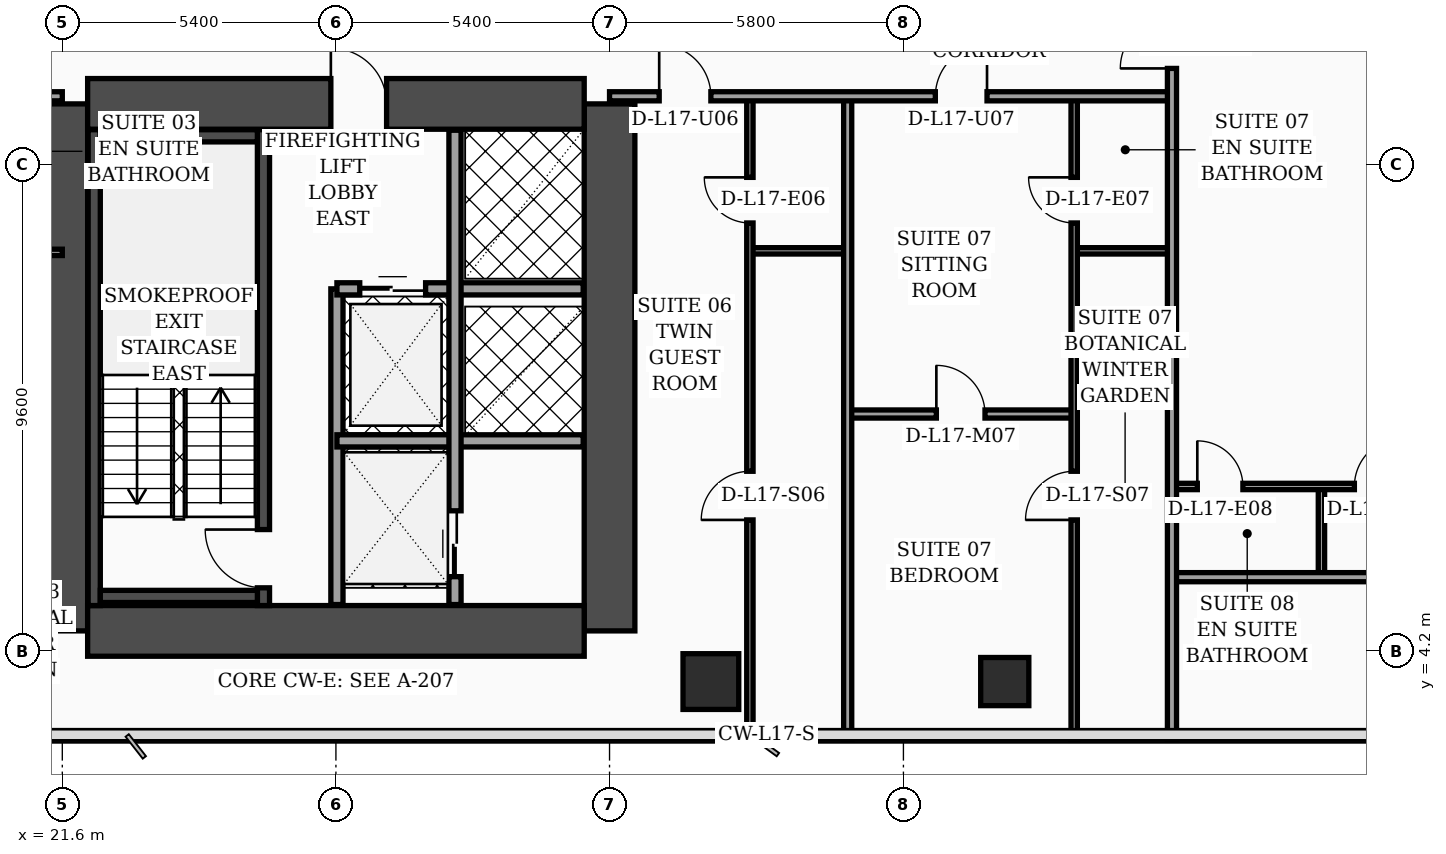
"""IFC4 building model, lengths in metres.
Left out: names, types, materials, properties, quantities, classifications, styles, units other than length and angle.
Written with IfcOpenShell. Run it as: python <this file> out.ifc"""

import sys

from ifc_helpers import new_model, si_unit, direction, frame, frame_2d, origin, origin_2d, place, context, subcontext, project, spatial, rectangle, hollow_rectangle, extrude, element, fill, save


model = new_model("IFC4")
c1 = context("Model", 3, precision=1e-05, world=origin(), true_north=direction((0.0, 1.0)))
c2 = subcontext(c1, "Body", "Model", "MODEL_VIEW")
j1 = project(units=[si_unit("LENGTHUNIT", "METRE"), si_unit("PLANEANGLEUNIT", "RADIAN")], contexts=[c1])
p1 = place(None, origin())
s1 = spatial("IfcSite", under=j1, at=p1, CompositionType="ELEMENT")
p2 = place(p1, origin())
s2 = spatial("IfcBuilding", under=s1, at=p2, CompositionType="ELEMENT")
p3 = place(p2, frame((0.0, 0.0, 73.6)))
s3 = spatial("IfcBuildingStorey", under=s2, at=p3, CompositionType="ELEMENT", Elevation=73.6)
for number, where, z_axis, x_axis in (
    (1, (21.6, 4.6, 0.0), (0.0, 0.0, 1.0), (0.0, 1.0, 0.0)),
    (2, (32.4, 4.6, 0.0), (0.0, 0.0, 1.0), (0.0, 1.0, 0.0)),
):
    element("IfcWall", number, at=place(p3, frame(where, z_axis=z_axis, x_axis=x_axis)), inside=s3, PredefinedType="SHEAR", context=c2, shape_type="SweptSolid", body=[
        extrude(rectangle(XDim=10.4, YDim=1.0, at=frame_2d((5.2, 0.0))), origin(), (0.0, 0.0, 1.0), 3.56),
    ])
p4 = place(p3, frame((22.1, 15.0, 0.0), z_axis=(0.0, 0.0, 1.0), x_axis=(1.0, 0.0, 0.0)))
e3 = element("IfcWall", 3, at=p4, inside=s3, PredefinedType="SHEAR", context=c2, shape_type="SweptSolid", body=[
    extrude(rectangle(XDim=9.8, YDim=1.0, at=frame_2d((4.9, 0.0))), origin(), (0.0, 0.0, 1.0), 3.56),
])
p5 = place(p4, frame((4.8, 0.0, 0.0)))
e4 = element("IfcOpeningElement", 4, at=p5, cuts=e3, PredefinedType="OPENING", context=c2, shape_type="SweptSolid", body=[
    extrude(rectangle(XDim=1.1, YDim=2.2, at=frame_2d((0.55, 1.1))), frame((0.0, 0.51, 0.0), z_axis=(0.0, -1.0, 0.0), x_axis=(1.0, 0.0, 0.0)), (0.0, 0.0, 1.0), 1.02),
])
p6 = place(p3, frame((22.1, 4.6, 0.0), z_axis=(0.0, 0.0, 1.0), x_axis=(1.0, 0.0, 0.0)))
e5 = element("IfcWall", 5, at=p6, inside=s3, PredefinedType="SHEAR", context=c2, shape_type="SweptSolid", body=[
    extrude(rectangle(XDim=9.8, YDim=1.0, at=frame_2d((4.9, 0.0))), origin(), (0.0, 0.0, 1.0), 3.56),
])
p7 = place(p3, frame((22.23, 5.1, 0.0), z_axis=(0.0, 0.0, 1.0), x_axis=(0.0, 1.0, 0.0)))
e6 = element("IfcWall", 6, at=p7, inside=s3, PredefinedType="SOLIDWALL", context=c2, shape_type="SweptSolid", body=[
    extrude(rectangle(XDim=9.39, YDim=0.24, at=frame_2d((4.695, 0.0))), origin(), (0.0, 0.0, 1.0), 3.56),
])
p8 = place(p3, frame((25.57, 5.1, 0.0), z_axis=(0.0, 0.0, 1.0), x_axis=(0.0, 1.0, 0.0)))
e7 = element("IfcWall", 7, at=p8, inside=s3, PredefinedType="SOLIDWALL", context=c2, shape_type="SweptSolid", body=[
    extrude(rectangle(XDim=9.39, YDim=0.24, at=frame_2d((4.695, 0.0))), origin(), (0.0, 0.0, 1.0), 3.56),
])
p9 = place(p8, frame((0.35, 0.0, 0.0)))
e8 = element("IfcOpeningElement", 8, at=p9, cuts=e7, PredefinedType="OPENING", context=c2, shape_type="SweptSolid", body=[
    extrude(rectangle(XDim=1.15, YDim=2.2, at=frame_2d((0.575, 1.1))), frame((0.0, 0.13, 0.0), z_axis=(0.0, -1.0, 0.0), x_axis=(1.0, 0.0, 0.0)), (0.0, 0.0, 1.0), 0.26),
])
for number, where, z_axis, x_axis in (
    (9, (22.35, 5.28, 0.0), (0.0, 0.0, 1.0), (1.0, 0.0, 0.0)),
    (10, (22.35, 14.37, 0.0), (0.0, 0.0, 1.0), (1.0, 0.0, 0.0)),
):
    element("IfcWall", number, at=place(p3, frame(where, z_axis=z_axis, x_axis=x_axis)), inside=s3, PredefinedType="SOLIDWALL", context=c2, shape_type="SweptSolid", body=[
        extrude(rectangle(XDim=3.1, YDim=0.24, at=frame_2d((1.55, 0.0))), origin(), (0.0, 0.0, 1.0), 3.56),
    ])
p10 = place(p3, frame((34.4, 3.6, 0.0), z_axis=(0.0, 0.0, 1.0), x_axis=(1.0, 0.0, 0.0)))
e11 = element("IfcColumn", 11, at=p10, inside=s3, PredefinedType="COLUMN", context=c2, shape_type="SweptSolid", body=[
    extrude(hollow_rectangle(XDim=1.1, YDim=1.1, WallThickness=0.045, at=origin_2d()), origin(), (0.0, 0.0, 1.0), 3.56),
])
p11 = place(p3, frame((40.2, 3.6, 0.0), z_axis=(0.0, 0.0, 1.0), x_axis=(1.0, 0.0, 0.0)))
e12 = element("IfcColumn", 12, at=p11, inside=s3, PredefinedType="COLUMN", context=c2, shape_type="SweptSolid", body=[
    extrude(hollow_rectangle(XDim=0.95, YDim=0.95, WallThickness=0.04, at=origin_2d()), origin(), (0.0, 0.0, 1.0), 3.56),
])
p12 = place(p3, frame((27.02, 5.12, 0.0), z_axis=(0.0, 0.0, 1.0), x_axis=(0.0, 1.0, 0.0)))
e13 = element("IfcWall", 13, at=p12, inside=s3, PredefinedType="SOLIDWALL", context=c2, shape_type="SweptSolid", body=[
    extrude(rectangle(XDim=6.23, YDim=0.24, at=frame_2d((3.115, 0.0))), origin(), (0.0, 0.0, 1.0), 3.56),
])
p13 = place(p3, frame((27.02, 11.35, 0.0), z_axis=(0.0, 0.0, 1.0), x_axis=(1.0, 0.0, 0.0)))
e14 = element("IfcWall", 14, at=p13, inside=s3, PredefinedType="SOLIDWALL", context=c2, shape_type="SweptSolid", body=[
    extrude(rectangle(XDim=4.86, YDim=0.24, at=frame_2d((2.43, 0.0))), origin(), (0.0, 0.0, 1.0), 3.56),
])
p14 = place(p13, frame((0.45, 0.0, 0.0)))
e15 = element("IfcOpeningElement", 15, at=p14, cuts=e14, PredefinedType="OPENING", context=c2, shape_type="SweptSolid", body=[
    extrude(rectangle(XDim=1.3, YDim=2.35, at=frame_2d((0.65, 1.175))), frame((0.0, 0.13, 0.0), z_axis=(0.0, -1.0, 0.0), x_axis=(1.0, 0.0, 0.0)), (0.0, 0.0, 1.0), 0.26),
])
p15 = place(p3, frame((27.02, 8.35, 0.0), z_axis=(0.0, 0.0, 1.0), x_axis=(1.0, 0.0, 0.0)))
e16 = element("IfcWall", 16, at=p15, inside=s3, PredefinedType="SOLIDWALL", context=c2, shape_type="SweptSolid", body=[
    extrude(rectangle(XDim=4.86, YDim=0.24, at=frame_2d((2.43, 0.0))), origin(), (0.0, 0.0, 1.0), 3.09),
])
p16 = place(p3, frame((29.35, 5.12, 0.0), z_axis=(0.0, 0.0, 1.0), x_axis=(0.0, 1.0, 0.0)))
e17 = element("IfcWall", 17, at=p16, inside=s3, PredefinedType="SOLIDWALL", context=c2, shape_type="SweptSolid", body=[
    extrude(rectangle(XDim=9.36, YDim=0.24, at=frame_2d((4.68, 0.0))), origin(), (0.0, 0.0, 1.0), 3.56),
])
p17 = place(p16, frame((0.55, 0.0, 0.0)))
e18 = element("IfcOpeningElement", 18, at=p17, cuts=e17, PredefinedType="OPENING", context=c2, shape_type="SweptSolid", body=[
    extrude(rectangle(XDim=1.3, YDim=2.35, at=frame_2d((0.65, 1.175))), frame((0.0, 0.13, 0.0), z_axis=(0.0, -1.0, 0.0), x_axis=(1.0, 0.0, 0.0)), (0.0, 0.0, 1.0), 0.26),
])
p18 = place(p3, frame((19.6, 12.07, 0.0), z_axis=(0.0, 0.0, 1.0), x_axis=(1.0, 0.0, 0.0)))
e19 = element("IfcWall", 19, at=p18, inside=s3, PredefinedType="PARTITIONING", context=c2, shape_type="SweptSolid", body=[
    extrude(rectangle(XDim=2.0, YDim=0.125, at=frame_2d((1.0, 0.0))), origin(), (0.0, 0.0, 1.0), 3.56),
])
p19 = place(p3, frame((15.15, 15.15, 0.0), z_axis=(0.0, 0.0, 1.0), x_axis=(1.0, 0.0, 0.0)))
e20 = element("IfcWall", 20, at=p19, inside=s3, PredefinedType="PARTITIONING", context=c2, shape_type="SweptSolid", body=[
    extrude(rectangle(XDim=6.45, YDim=0.18, at=frame_2d((3.225, 0.0))), origin(), (0.0, 0.0, 1.0), 2.34),
])
p20 = place(p19, frame((1.74, 0.0, 0.0)))
e21 = element("IfcOpeningElement", 21, at=p20, cuts=e20, PredefinedType="OPENING", context=c2, shape_type="SweptSolid", body=[
    extrude(rectangle(XDim=1.02, YDim=2.2, at=frame_2d((0.51, 1.1))), frame((0.0, 0.1, 0.0), z_axis=(0.0, -1.0, 0.0), x_axis=(1.0, 0.0, 0.0)), (0.0, 0.0, 1.0), 0.2),
])
p21 = place(p3, frame((35.17, 12.1, 0.0), z_axis=(0.0, 0.0, 1.0), x_axis=(1.0, 0.0, 0.0)))
e22 = element("IfcWall", 22, at=p21, inside=s3, PredefinedType="PARTITIONING", context=c2, shape_type="SweptSolid", body=[
    extrude(rectangle(XDim=1.93, YDim=0.125, at=frame_2d((0.965, 0.0))), origin(), (0.0, 0.0, 1.0), 3.56),
])
p22 = place(p3, frame((35.17, 2.44, 0.0), z_axis=(0.0, 0.0, 1.0), x_axis=(0.0, 1.0, 0.0)))
e23 = element("IfcWall", 23, at=p22, inside=s3, PredefinedType="PARTITIONING", context=c2, shape_type="SweptSolid", body=[
    extrude(rectangle(XDim=12.71, YDim=0.125, at=frame_2d((6.355, 0.0))), origin(), (0.0, 0.0, 1.0), 2.84),
])
p23 = place(p22, frame((4.35, 0.0, 0.0)))
e24 = element("IfcOpeningElement", 24, at=p23, cuts=e23, PredefinedType="OPENING", context=c2, shape_type="SweptSolid", body=[
    extrude(rectangle(XDim=0.96, YDim=2.2, at=frame_2d((0.48, 1.1))), frame((0.0, 0.073, 0.0), z_axis=(0.0, -1.0, 0.0), x_axis=(1.0, 0.0, 0.0)), (0.0, 0.0, 1.0), 0.145),
])
p24 = place(p22, frame((10.21, 0.0, 0.0)))
e25 = element("IfcOpeningElement", 25, at=p24, cuts=e23, PredefinedType="OPENING", context=c2, shape_type="SweptSolid", body=[
    extrude(rectangle(XDim=0.9, YDim=2.15, at=frame_2d((0.45, 1.075))), frame((0.0, 0.073, 0.0), z_axis=(0.0, -1.0, 0.0), x_axis=(1.0, 0.0, 0.0)), (0.0, 0.0, 1.0), 0.145),
])
p25 = place(p3, frame((41.57, 12.1, 0.0), z_axis=(0.0, 0.0, 1.0), x_axis=(1.0, 0.0, 0.0)))
e26 = element("IfcWall", 26, at=p25, inside=s3, PredefinedType="PARTITIONING", context=c2, shape_type="SweptSolid", body=[
    extrude(rectangle(XDim=1.93, YDim=0.125, at=frame_2d((0.965, 0.0))), origin(), (0.0, 0.0, 1.0), 3.56),
])
p26 = place(p3, frame((37.1, 8.88, 0.0), z_axis=(0.0, 0.0, 1.0), x_axis=(1.0, 0.0, 0.0)))
e27 = element("IfcWall", 27, at=p26, inside=s3, PredefinedType="PARTITIONING", context=c2, shape_type="SweptSolid", body=[
    extrude(rectangle(XDim=4.47, YDim=0.16, at=frame_2d((2.235, 0.0))), origin(), (0.0, 0.0, 1.0), 2.84),
])
p27 = place(p26, frame((1.75, 0.0, 0.0)))
e28 = element("IfcOpeningElement", 28, at=p27, cuts=e27, PredefinedType="OPENING", context=c2, shape_type="SweptSolid", body=[
    extrude(rectangle(XDim=0.96, YDim=2.2, at=frame_2d((0.48, 1.1))), frame((0.0, 0.09, 0.0), z_axis=(0.0, -1.0, 0.0), x_axis=(1.0, 0.0, 0.0)), (0.0, 0.0, 1.0), 0.18),
])
p28 = place(p3, frame((41.57, 2.44, 0.0), z_axis=(0.0, 0.0, 1.0), x_axis=(0.0, 1.0, 0.0)))
e29 = element("IfcWall", 29, at=p28, inside=s3, PredefinedType="PARTITIONING", context=c2, shape_type="SweptSolid", body=[
    extrude(rectangle(XDim=12.71, YDim=0.125, at=frame_2d((6.355, 0.0))), origin(), (0.0, 0.0, 1.0), 3.04),
])
p29 = place(p28, frame((4.35, 0.0, 0.0)))
e30 = element("IfcOpeningElement", 30, at=p29, cuts=e29, PredefinedType="OPENING", context=c2, shape_type="SweptSolid", body=[
    extrude(rectangle(XDim=0.96, YDim=2.2, at=frame_2d((0.48, 1.1))), frame((0.0, 0.073, 0.0), z_axis=(0.0, -1.0, 0.0), x_axis=(1.0, 0.0, 0.0)), (0.0, 0.0, 1.0), 0.145),
])
p30 = place(p28, frame((10.21, 0.0, 0.0)))
e31 = element("IfcOpeningElement", 31, at=p30, cuts=e29, PredefinedType="OPENING", context=c2, shape_type="SweptSolid", body=[
    extrude(rectangle(XDim=0.9, YDim=2.15, at=frame_2d((0.45, 1.075))), frame((0.0, 0.073, 0.0), z_axis=(0.0, -1.0, 0.0), x_axis=(1.0, 0.0, 0.0)), (0.0, 0.0, 1.0), 0.145),
])
p31 = place(p3, frame((37.1, 2.44, 0.0), z_axis=(0.0, 0.0, 1.0), x_axis=(0.0, 1.0, 0.0)))
e32 = element("IfcWall", 32, at=p31, inside=s3, PredefinedType="PARTITIONING", context=c2, shape_type="SweptSolid", body=[
    extrude(rectangle(XDim=12.71, YDim=0.16, at=frame_2d((6.355, 0.0))), origin(), (0.0, 0.0, 1.0), 2.84),
])
p32 = place(p3, frame((32.4, 15.15, 0.0), z_axis=(0.0, 0.0, 1.0), x_axis=(1.0, 0.0, 0.0)))
e33 = element("IfcWall", 33, at=p32, inside=s3, PredefinedType="PARTITIONING", context=c2, shape_type="SweptSolid", body=[
    extrude(rectangle(XDim=11.1, YDim=0.18, at=frame_2d((5.55, 0.0))), origin(), (0.0, 0.0, 1.0), 2.84),
])
p33 = place(p32, frame((0.98, 0.0, 0.0)))
e34 = element("IfcOpeningElement", 34, at=p33, cuts=e33, PredefinedType="OPENING", context=c2, shape_type="SweptSolid", body=[
    extrude(rectangle(XDim=1.02, YDim=2.2, at=frame_2d((0.51, 1.1))), frame((0.0, 0.1, 0.0), z_axis=(0.0, -1.0, 0.0), x_axis=(1.0, 0.0, 0.0)), (0.0, 0.0, 1.0), 0.2),
])
p34 = place(p32, frame((6.43, 0.0, 0.0)))
e35 = element("IfcOpeningElement", 35, at=p34, cuts=e33, PredefinedType="OPENING", context=c2, shape_type="SweptSolid", body=[
    extrude(rectangle(XDim=1.02, YDim=2.2, at=frame_2d((0.51, 1.1))), frame((0.0, 0.1, 0.0), z_axis=(0.0, -1.0, 0.0), x_axis=(1.0, 0.0, 0.0)), (0.0, 0.0, 1.0), 0.2),
])
p35 = place(p3, frame((46.45, 5.66, 0.0), z_axis=(0.0, 0.0, 1.0), x_axis=(0.0, 1.0, 0.0)))
e36 = element("IfcWall", 36, at=p35, inside=s3, PredefinedType="PARTITIONING", context=c2, shape_type="SweptSolid", body=[
    extrude(rectangle(XDim=1.79, YDim=0.125, at=frame_2d((0.895, 0.0))), origin(), (0.0, 0.0, 1.0), 3.56),
])
p36 = place(p3, frame((43.5, 7.45, 0.0), z_axis=(0.0, 0.0, 1.0), x_axis=(1.0, 0.0, 0.0)))
e37 = element("IfcWall", 37, at=p36, inside=s3, PredefinedType="PARTITIONING", context=c2, shape_type="SweptSolid", body=[
    extrude(rectangle(XDim=19.46, YDim=0.125, at=frame_2d((9.73, 0.0))), origin(), (0.0, 0.0, 1.0), 2.84),
])
p37 = place(p36, frame((0.5, 0.0, 0.0)))
e38 = element("IfcOpeningElement", 38, at=p37, cuts=e37, PredefinedType="OPENING", context=c2, shape_type="SweptSolid", body=[
    extrude(rectangle(XDim=0.9, YDim=2.15, at=frame_2d((0.45, 1.075))), frame((0.0, 0.073, 0.0), z_axis=(0.0, -1.0, 0.0), x_axis=(1.0, 0.0, 0.0)), (0.0, 0.0, 1.0), 0.145),
])
p38 = place(p36, frame((3.6, 0.0, 0.0)))
e39 = element("IfcOpeningElement", 39, at=p38, cuts=e37, PredefinedType="OPENING", context=c2, shape_type="SweptSolid", body=[
    extrude(rectangle(XDim=0.96, YDim=2.2, at=frame_2d((0.48, 1.1))), frame((0.0, 0.073, 0.0), z_axis=(0.0, -1.0, 0.0), x_axis=(1.0, 0.0, 0.0)), (0.0, 0.0, 1.0), 0.145),
])
p39 = place(p3, frame((43.5, 5.66, 0.0), z_axis=(0.0, 0.0, 1.0), x_axis=(1.0, 0.0, 0.0)))
e40 = element("IfcWall", 40, at=p39, inside=s3, PredefinedType="PARTITIONING", context=c2, shape_type="SweptSolid", body=[
    extrude(rectangle(XDim=16.9, YDim=0.18, at=frame_2d((8.45, 0.0))), origin(), (0.0, 0.0, 1.0), 2.84),
])
p40 = place(p3, frame((43.5, 2.44, 0.0), z_axis=(0.0, 0.0, 1.0), x_axis=(0.0, 1.0, 0.0)))
e41 = element("IfcWall", 41, at=p40, inside=s3, PredefinedType="PARTITIONING", context=c2, shape_type="SweptSolid", body=[
    extrude(rectangle(XDim=31.04, YDim=0.18, at=frame_2d((15.52, 0.0))), origin(), (0.0, 0.0, 1.0), 2.84),
])
p41 = place(p40, frame((13.26, 0.0, 0.0)))
e42 = element("IfcOpeningElement", 42, at=p41, cuts=e41, PredefinedType="OPENING", context=c2, shape_type="SweptSolid", body=[
    extrude(rectangle(XDim=1.02, YDim=2.2, at=frame_2d((0.51, 1.1))), frame((0.0, 0.1, 0.0), z_axis=(0.0, -1.0, 0.0), x_axis=(1.0, 0.0, 0.0)), (0.0, 0.0, 1.0), 0.2),
])
p42 = place(p40, frame((17.77, 0.0, 0.0)))
e43 = element("IfcOpeningElement", 43, at=p42, cuts=e41, PredefinedType="OPENING", context=c2, shape_type="SweptSolid", body=[
    extrude(rectangle(XDim=1.02, YDim=2.2, at=frame_2d((0.51, 1.1))), frame((0.0, 0.1, 0.0), z_axis=(0.0, -1.0, 0.0), x_axis=(1.0, 0.0, 0.0)), (0.0, 0.0, 1.0), 0.2),
])
p43 = place(p40, frame((25.58, 0.0, 0.0)))
e44 = element("IfcOpeningElement", 44, at=p43, cuts=e41, PredefinedType="OPENING", context=c2, shape_type="SweptSolid", body=[
    extrude(rectangle(XDim=1.02, YDim=2.2, at=frame_2d((0.51, 1.1))), frame((0.0, 0.1, 0.0), z_axis=(0.0, -1.0, 0.0), x_axis=(1.0, 0.0, 0.0)), (0.0, 0.0, 1.0), 0.2),
])
p44 = place(p14, origin())
e45 = element("IfcDoor", 45, at=p44, inside=s3, OperationType="DOUBLE_DOOR_SLIDING", PredefinedType="DOOR", context=c2, shape_type="SweptSolid", body=[
    extrude(rectangle(XDim=1.3, YDim=2.35, at=frame_2d((0.65, 1.175))), frame((0.0, 0.025, 0.0), z_axis=(0.0, -1.0, 0.0), x_axis=(1.0, 0.0, 0.0)), (0.0, 0.0, 1.0), 0.05),
])
fill(e15, e45)
p45 = place(p17, origin())
e46 = element("IfcDoor", 46, at=p45, inside=s3, OperationType="DOUBLE_DOOR_SLIDING", PredefinedType="DOOR", context=c2, shape_type="SweptSolid", body=[
    extrude(rectangle(XDim=1.3, YDim=2.35, at=frame_2d((0.65, 1.175))), frame((0.0, 0.025, 0.0), z_axis=(0.0, -1.0, 0.0), x_axis=(1.0, 0.0, 0.0)), (0.0, 0.0, 1.0), 0.05),
])
fill(e18, e46)
p46 = place(p23, origin())
e47 = element("IfcDoor", 47, at=p46, inside=s3, OperationType="SINGLE_SWING_LEFT", PredefinedType="DOOR", context=c2, shape_type="SweptSolid", body=[
    extrude(rectangle(XDim=0.96, YDim=2.2, at=frame_2d((0.48, 1.1))), frame((0.0, 0.025, 0.0), z_axis=(0.0, -1.0, 0.0), x_axis=(1.0, 0.0, 0.0)), (0.0, 0.0, 1.0), 0.05),
])
fill(e24, e47)
p47 = place(p24, origin())
e48 = element("IfcDoor", 48, at=p47, inside=s3, OperationType="SINGLE_SWING_RIGHT", PredefinedType="DOOR", context=c2, shape_type="SweptSolid", body=[
    extrude(rectangle(XDim=0.9, YDim=2.15, at=frame_2d((0.45, 1.075))), frame((0.0, 0.025, 0.0), z_axis=(0.0, -1.0, 0.0), x_axis=(1.0, 0.0, 0.0)), (0.0, 0.0, 1.0), 0.05),
])
fill(e25, e48)
p48 = place(p27, origin())
e49 = element("IfcDoor", 49, at=p48, inside=s3, OperationType="SINGLE_SWING_LEFT", PredefinedType="DOOR", context=c2, shape_type="SweptSolid", body=[
    extrude(rectangle(XDim=0.96, YDim=2.2, at=frame_2d((0.48, 1.1))), frame((0.0, 0.025, 0.0), z_axis=(0.0, -1.0, 0.0), x_axis=(1.0, 0.0, 0.0)), (0.0, 0.0, 1.0), 0.05),
])
fill(e28, e49)
p49 = place(p29, origin())
e50 = element("IfcDoor", 50, at=p49, inside=s3, OperationType="SINGLE_SWING_LEFT", PredefinedType="DOOR", context=c2, shape_type="SweptSolid", body=[
    extrude(rectangle(XDim=0.96, YDim=2.2, at=frame_2d((0.48, 1.1))), frame((0.0, 0.025, 0.0), z_axis=(0.0, -1.0, 0.0), x_axis=(1.0, 0.0, 0.0)), (0.0, 0.0, 1.0), 0.05),
])
fill(e30, e50)
p50 = place(p30, origin())
e51 = element("IfcDoor", 51, at=p50, inside=s3, OperationType="SINGLE_SWING_RIGHT", PredefinedType="DOOR", context=c2, shape_type="SweptSolid", body=[
    extrude(rectangle(XDim=0.9, YDim=2.15, at=frame_2d((0.45, 1.075))), frame((0.0, 0.025, 0.0), z_axis=(0.0, -1.0, 0.0), x_axis=(1.0, 0.0, 0.0)), (0.0, 0.0, 1.0), 0.05),
])
fill(e31, e51)
p51 = place(p33, origin())
e52 = element("IfcDoor", 52, at=p51, inside=s3, OperationType="SINGLE_SWING_LEFT", PredefinedType="DOOR", context=c2, shape_type="SweptSolid", body=[
    extrude(rectangle(XDim=1.02, YDim=2.2, at=frame_2d((0.51, 1.1))), frame((0.0, 0.025, 0.0), z_axis=(0.0, -1.0, 0.0), x_axis=(1.0, 0.0, 0.0)), (0.0, 0.0, 1.0), 0.05),
])
fill(e34, e52)
p52 = place(p34, origin())
e53 = element("IfcDoor", 53, at=p52, inside=s3, OperationType="SINGLE_SWING_RIGHT", PredefinedType="DOOR", context=c2, shape_type="SweptSolid", body=[
    extrude(rectangle(XDim=1.02, YDim=2.2, at=frame_2d((0.51, 1.1))), frame((0.0, 0.025, 0.0), z_axis=(0.0, -1.0, 0.0), x_axis=(1.0, 0.0, 0.0)), (0.0, 0.0, 1.0), 0.05),
])
fill(e35, e53)
p53 = place(p37, origin())
e54 = element("IfcDoor", 54, at=p53, inside=s3, OperationType="SINGLE_SWING_LEFT", PredefinedType="DOOR", context=c2, shape_type="SweptSolid", body=[
    extrude(rectangle(XDim=0.9, YDim=2.15, at=frame_2d((0.45, 1.075))), frame((0.0, 0.025, 0.0), z_axis=(0.0, -1.0, 0.0), x_axis=(1.0, 0.0, 0.0)), (0.0, 0.0, 1.0), 0.05),
])
fill(e38, e54)
p54 = place(p38, origin())
e55 = element("IfcDoor", 55, at=p54, inside=s3, OperationType="SINGLE_SWING_RIGHT", PredefinedType="DOOR", context=c2, shape_type="SweptSolid", body=[
    extrude(rectangle(XDim=0.96, YDim=2.2, at=frame_2d((0.48, 1.1))), frame((0.0, 0.025, 0.0), z_axis=(0.0, -1.0, 0.0), x_axis=(1.0, 0.0, 0.0)), (0.0, 0.0, 1.0), 0.05),
])
fill(e39, e55)
p55 = place(p41, origin())
e56 = element("IfcDoor", 56, at=p55, inside=s3, OperationType="SINGLE_SWING_LEFT", PredefinedType="DOOR", context=c2, shape_type="SweptSolid", body=[
    extrude(rectangle(XDim=1.02, YDim=2.2, at=frame_2d((0.51, 1.1))), frame((0.0, 0.025, 0.0), z_axis=(0.0, -1.0, 0.0), x_axis=(1.0, 0.0, 0.0)), (0.0, 0.0, 1.0), 0.05),
])
fill(e42, e56)
p56 = place(p9, origin())
e57 = element("IfcDoor", 57, at=p56, inside=s3, OperationType="SINGLE_SWING_RIGHT", PredefinedType="DOOR", context=c2, shape_type="SweptSolid", body=[
    extrude(rectangle(XDim=1.15, YDim=2.2, at=frame_2d((0.575, 1.1))), frame((0.0, 0.025, 0.0), z_axis=(0.0, -1.0, 0.0), x_axis=(1.0, 0.0, 0.0)), (0.0, 0.0, 1.0), 0.05),
])
fill(e8, e57)
p57 = place(p5, origin())
e58 = element("IfcDoor", 58, at=p57, inside=s3, OperationType="SINGLE_SWING_LEFT", PredefinedType="DOOR", context=c2, shape_type="SweptSolid", body=[
    extrude(rectangle(XDim=1.1, YDim=2.2, at=frame_2d((0.55, 1.1))), frame((0.0, 0.025, 0.0), z_axis=(0.0, -1.0, 0.0), x_axis=(1.0, 0.0, 0.0)), (0.0, 0.0, 1.0), 0.05),
])
fill(e4, e58)
save(model, sys.argv[1])
